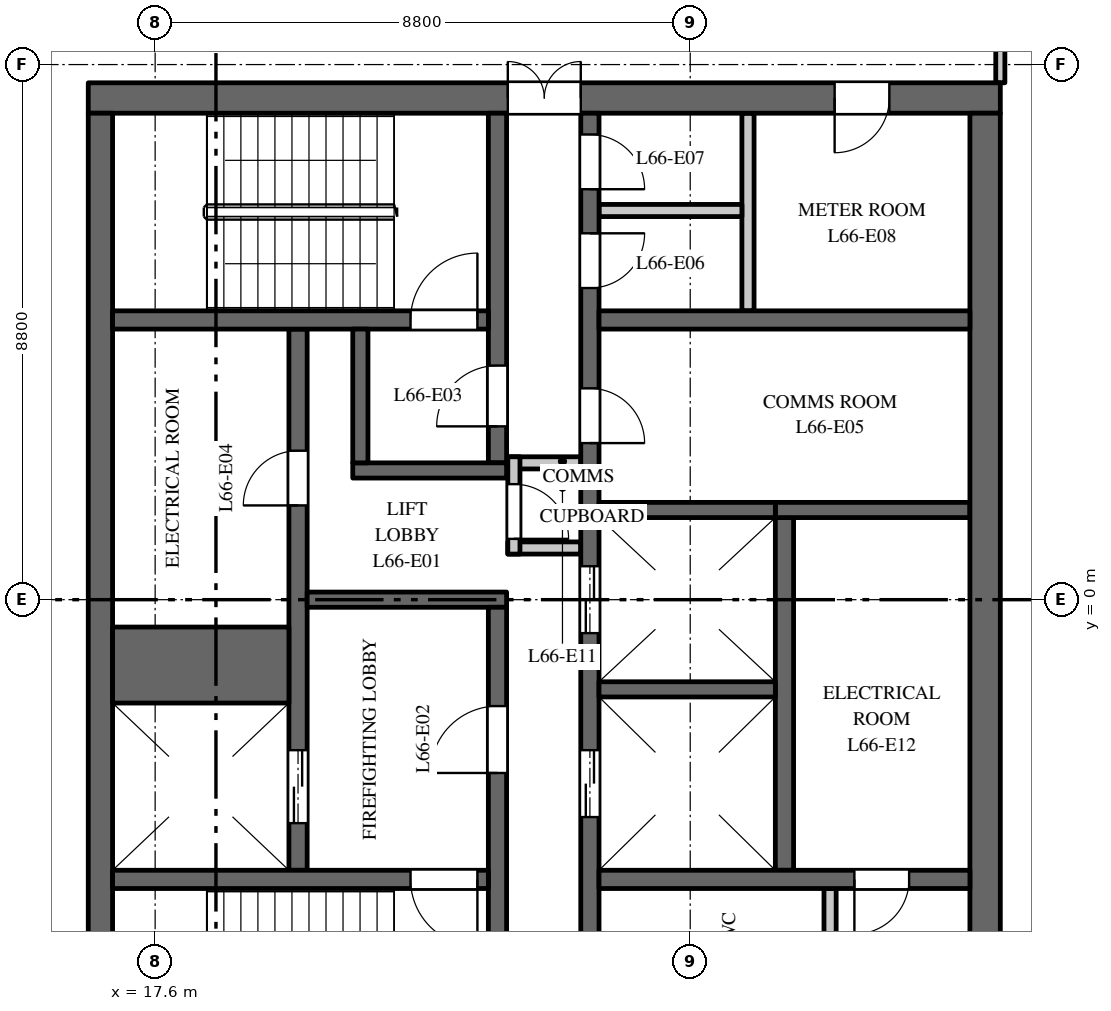
"""IFC4 building model, lengths in metres.
Left out: names, types, materials, properties, quantities, classifications, styles, units other than length and angle.
Written with IfcOpenShell. Run it as: python <this file> out.ifc"""

import sys

from ifc_helpers import new_model, si_unit, direction, frame, frame_2d, origin, place, context, subcontext, project, spatial, rectangle, extrude, element, fill, save


model = new_model("IFC4")
c1 = context("Model", 3, precision=1e-05, world=origin(), true_north=direction((0.0, 1.0)))
c2 = subcontext(c1, "Body", "Model", "MODEL_VIEW")
j1 = project(units=[si_unit("LENGTHUNIT", "METRE"), si_unit("PLANEANGLEUNIT", "RADIAN")], contexts=[c1])
p1 = place(None, origin())
s1 = spatial("IfcSite", under=j1, at=p1, CompositionType="ELEMENT")
p2 = place(p1, origin())
s2 = spatial("IfcBuilding", under=s1, at=p2, CompositionType="ELEMENT")
p3 = place(p2, frame((0.0, 0.0, 307.0)))
s3 = spatial("IfcBuildingStorey", under=s2, at=p3, CompositionType="ELEMENT", Elevation=307.0)
p4 = place(p3, frame((16.5, 8.25, 0.0), z_axis=(0.0, 0.0, 1.0), x_axis=(1.0, 0.0, 0.0)))
e1 = element("IfcWall", 1, at=p4, inside=s3, PredefinedType="SHEAR", context=c2, shape_type="SweptSolid", body=[
    extrude(rectangle(XDim=15.0, YDim=0.5, at=frame_2d((7.5, 0.0))), origin(), (0.0, 0.0, 1.0), 3.7),
])
p5 = place(p4, frame((6.9, 0.0, 0.0)))
e2 = element("IfcOpeningElement", 2, at=p5, cuts=e1, PredefinedType="OPENING", context=c2, shape_type="SweptSolid", body=[
    extrude(rectangle(XDim=1.2, YDim=2.1, at=frame_2d((0.6, 1.05))), frame((0.0, 0.26, 0.0), z_axis=(0.0, -1.0, 0.0), x_axis=(1.0, 0.0, 0.0)), (0.0, 0.0, 1.0), 0.52),
])
p6 = place(p4, frame((12.275, 0.0, 0.0)))
e3 = element("IfcOpeningElement", 3, at=p6, cuts=e1, PredefinedType="OPENING", context=c2, shape_type="SweptSolid", body=[
    extrude(rectangle(XDim=0.9, YDim=2.1, at=frame_2d((0.45, 1.05))), frame((0.0, 0.26, 0.0), z_axis=(0.0, -1.0, 0.0), x_axis=(1.0, 0.0, 0.0)), (0.0, 0.0, 1.0), 0.52),
])
p7 = place(p3, frame((27.95, -4.45, 0.0), z_axis=(0.0, 0.0, 1.0), x_axis=(0.0, 1.0, 0.0)))
e4 = element("IfcWall", 4, at=p7, inside=s3, PredefinedType="SHEAR", context=c2, shape_type="SweptSolid", body=[
    extrude(rectangle(XDim=5.8, YDim=0.3, at=frame_2d((2.9, 0.0))), origin(), (0.0, 0.0, 1.0), 3.7),
])
p8 = place(p3, frame((27.8, 1.475, 0.0), z_axis=(0.0, 0.0, 1.0), x_axis=(1.0, 0.0, 0.0)))
e5 = element("IfcWall", 5, at=p8, inside=s3, PredefinedType="SHEAR", context=c2, shape_type="SweptSolid", body=[
    extrude(rectangle(XDim=3.2, YDim=0.25, at=frame_2d((1.6, 0.0))), origin(), (0.0, 0.0, 1.0), 3.7),
])
p9 = place(p3, frame((19.95, -4.45, 0.0), z_axis=(0.0, 0.0, 1.0), x_axis=(0.0, 1.0, 0.0)))
e6 = element("IfcWall", 6, at=p9, inside=s3, PredefinedType="SHEAR", context=c2, shape_type="SweptSolid", body=[
    extrude(rectangle(XDim=8.9, YDim=0.3, at=frame_2d((4.45, 0.0))), origin(), (0.0, 0.0, 1.0), 3.7),
])
p10 = place(p9, frame((0.775, 0.0, 0.0)))
e7 = element("IfcOpeningElement", 7, at=p10, cuts=e6, PredefinedType="OPENING", context=c2, shape_type="SweptSolid", body=[
    extrude(rectangle(XDim=1.2, YDim=2.1, at=frame_2d((0.6, 1.05))), frame((0.0, 0.16, 0.0), z_axis=(0.0, -1.0, 0.0), x_axis=(1.0, 0.0, 0.0)), (0.0, 0.0, 1.0), 0.32),
])
p11 = place(p9, frame((6.0, 0.0, 0.0)))
e8 = element("IfcOpeningElement", 8, at=p11, cuts=e6, PredefinedType="OPENING", context=c2, shape_type="SweptSolid", body=[
    extrude(rectangle(XDim=0.9, YDim=2.1, at=frame_2d((0.45, 1.05))), frame((0.0, 0.16, 0.0), z_axis=(0.0, -1.0, 0.0), x_axis=(1.0, 0.0, 0.0)), (0.0, 0.0, 1.0), 0.32),
])
p12 = place(p3, frame((24.75, -8.0, 0.0), z_axis=(0.0, 0.0, 1.0), x_axis=(0.0, 1.0, 0.0)))
e9 = element("IfcWall", 9, at=p12, inside=s3, PredefinedType="SHEAR", context=c2, shape_type="SweptSolid", body=[
    extrude(rectangle(XDim=16.0, YDim=0.3, at=frame_2d((8.0, 0.0))), origin(), (0.0, 0.0, 1.0), 3.7),
])
p13 = place(p12, frame((4.425, 0.0, 0.0)))
e10 = element("IfcOpeningElement", 10, at=p13, cuts=e9, PredefinedType="OPENING", context=c2, shape_type="SweptSolid", body=[
    extrude(rectangle(XDim=1.1, YDim=2.1, at=frame_2d((0.55, 1.05))), frame((0.0, 0.16, 0.0), z_axis=(0.0, -1.0, 0.0), x_axis=(1.0, 0.0, 0.0)), (0.0, 0.0, 1.0), 0.32),
])
p14 = place(p12, frame((7.45, 0.0, 0.0)))
e11 = element("IfcOpeningElement", 11, at=p14, cuts=e9, PredefinedType="OPENING", context=c2, shape_type="SweptSolid", body=[
    extrude(rectangle(XDim=1.1, YDim=2.1, at=frame_2d((0.55, 1.05))), frame((0.0, 0.16, 0.0), z_axis=(0.0, -1.0, 0.0), x_axis=(1.0, 0.0, 0.0)), (0.0, 0.0, 1.0), 0.32),
])
p15 = place(p12, frame((10.575, 0.0, 0.0)))
e12 = element("IfcOpeningElement", 12, at=p15, cuts=e9, PredefinedType="OPENING", context=c2, shape_type="SweptSolid", body=[
    extrude(rectangle(XDim=0.9, YDim=2.1, at=frame_2d((0.45, 1.05))), frame((0.0, 0.16, 0.0), z_axis=(0.0, -1.0, 0.0), x_axis=(1.0, 0.0, 0.0)), (0.0, 0.0, 1.0), 0.32),
])
p16 = place(p12, frame((13.125, 0.0, 0.0)))
e13 = element("IfcOpeningElement", 13, at=p16, cuts=e9, PredefinedType="OPENING", context=c2, shape_type="SweptSolid", body=[
    extrude(rectangle(XDim=0.9, YDim=2.1, at=frame_2d((0.45, 1.05))), frame((0.0, 0.16, 0.0), z_axis=(0.0, -1.0, 0.0), x_axis=(1.0, 0.0, 0.0)), (0.0, 0.0, 1.0), 0.32),
])
p17 = place(p12, frame((14.75, 0.0, 0.0)))
e14 = element("IfcOpeningElement", 14, at=p17, cuts=e9, PredefinedType="OPENING", context=c2, shape_type="SweptSolid", body=[
    extrude(rectangle(XDim=0.9, YDim=2.1, at=frame_2d((0.45, 1.05))), frame((0.0, 0.16, 0.0), z_axis=(0.0, -1.0, 0.0), x_axis=(1.0, 0.0, 0.0)), (0.0, 0.0, 1.0), 0.32),
])
p18 = place(p12, frame((1.35, 0.0, 0.0)))
e15 = element("IfcOpeningElement", 15, at=p18, cuts=e9, PredefinedType="OPENING", context=c2, shape_type="SweptSolid", body=[
    extrude(rectangle(XDim=0.9, YDim=2.1, at=frame_2d((0.45, 1.05))), frame((0.0, 0.16, 0.0), z_axis=(0.0, -1.0, 0.0), x_axis=(1.0, 0.0, 0.0)), (0.0, 0.0, 1.0), 0.32),
])
p19 = place(p3, frame((20.1, 0.0, 0.0), z_axis=(0.0, 0.0, 1.0), x_axis=(1.0, 0.0, 0.0)))
e16 = element("IfcWall", 16, at=p19, inside=s3, PredefinedType="SHEAR", context=c2, shape_type="SweptSolid", body=[
    extrude(rectangle(XDim=3.28, YDim=0.25, at=frame_2d((1.64, 0.0))), origin(), (0.0, 0.0, 1.0), 3.7),
])
p20 = place(p3, frame((16.7, -8.0, 0.0), z_axis=(0.0, 0.0, 1.0), x_axis=(0.0, 1.0, 0.0)))
e17 = element("IfcWall", 17, at=p20, inside=s3, PredefinedType="SHEAR", context=c2, shape_type="SweptSolid", body=[
    extrude(rectangle(XDim=16.0, YDim=0.4, at=frame_2d((8.0, 0.0))), origin(), (0.0, 0.0, 1.0), 3.7),
])
for number, where, z_axis, x_axis in (
    (18, (23.4, 0.85, 0.0), (0.0, 0.0, 1.0), (1.0, 0.0, 0.0)),
    (19, (23.4, 2.25, 0.0), (0.0, 0.0, 1.0), (1.0, 0.0, 0.0)),
):
    element("IfcWall", number, at=place(p3, frame(where, z_axis=z_axis, x_axis=x_axis)), inside=s3, PredefinedType="PARTITIONING", context=c2, shape_type="SweptSolid", body=[
        extrude(rectangle(XDim=1.2, YDim=0.2, at=frame_2d((0.6, 0.0))), origin(), (0.0, 0.0, 1.0), 3.7),
    ])
p21 = place(p3, frame((23.5, 0.75, 0.0), z_axis=(0.0, 0.0, 1.0), x_axis=(0.0, 1.0, 0.0)))
e20 = element("IfcWall", 20, at=p21, inside=s3, PredefinedType="PARTITIONING", context=c2, shape_type="SweptSolid", body=[
    extrude(rectangle(XDim=1.6, YDim=0.2, at=frame_2d((0.8, 0.0))), origin(), (0.0, 0.0, 1.0), 3.7),
])
p22 = place(p21, frame((0.25, 0.0, 0.0)))
e21 = element("IfcOpeningElement", 21, at=p22, cuts=e20, PredefinedType="OPENING", context=c2, shape_type="SweptSolid", body=[
    extrude(rectangle(XDim=0.9, YDim=2.1, at=frame_2d((0.45, 1.05))), frame((0.0, 0.11, 0.0), z_axis=(0.0, -1.0, 0.0), x_axis=(1.0, 0.0, 0.0)), (0.0, 0.0, 1.0), 0.22),
])
p23 = place(p3, frame((31.25, -8.0, 0.0), z_axis=(0.0, 0.0, 1.0), x_axis=(0.0, 1.0, 0.0)))
e22 = element("IfcWall", 22, at=p23, inside=s3, PredefinedType="SHEAR", context=c2, shape_type="SweptSolid", body=[
    extrude(rectangle(XDim=16.0, YDim=0.5, at=frame_2d((8.0, 0.0))), origin(), (0.0, 0.0, 1.0), 3.7),
])
p24 = place(p3, frame((24.9, 4.6, 0.0), z_axis=(0.0, 0.0, 1.0), x_axis=(1.0, 0.0, 0.0)))
e23 = element("IfcWall", 23, at=p24, inside=s3, PredefinedType="SHEAR", context=c2, shape_type="SweptSolid", body=[
    extrude(rectangle(XDim=6.1, YDim=0.3, at=frame_2d((3.05, 0.0))), origin(), (0.0, 0.0, 1.0), 3.7),
])
for number, where, z_axis, x_axis in (
    (24, (27.35, 4.75, 0.0), (0.0, 0.0, 1.0), (0.0, 1.0, 0.0)),
    (25, (28.7, -8.0, 0.0), (0.0, 0.0, 1.0), (0.0, 1.0, 0.0)),
):
    element("IfcWall", number, at=place(p3, frame(where, z_axis=z_axis, x_axis=x_axis)), inside=s3, PredefinedType="PARTITIONING", context=c2, shape_type="SweptSolid", body=[
        extrude(rectangle(XDim=3.25, YDim=0.2, at=frame_2d((1.625, 0.0))), origin(), (0.0, 0.0, 1.0), 3.7),
    ])
p25 = place(p3, frame((24.9, 6.4, 0.0), z_axis=(0.0, 0.0, 1.0), x_axis=(1.0, 0.0, 0.0)))
e26 = element("IfcWall", 26, at=p25, inside=s3, PredefinedType="PARTITIONING", context=c2, shape_type="SweptSolid", body=[
    extrude(rectangle(XDim=2.35, YDim=0.2, at=frame_2d((1.175, 0.0))), origin(), (0.0, 0.0, 1.0), 3.7),
])
p26 = place(p3, frame((24.9, -4.6, 0.0), z_axis=(0.0, 0.0, 1.0), x_axis=(1.0, 0.0, 0.0)))
e27 = element("IfcWall", 27, at=p26, inside=s3, PredefinedType="SHEAR", context=c2, shape_type="SweptSolid", body=[
    extrude(rectangle(XDim=6.1, YDim=0.3, at=frame_2d((3.05, 0.0))), origin(), (0.0, 0.0, 1.0), 3.7),
])
p27 = place(p26, frame((4.2, 0.0, 0.0)))
e28 = element("IfcOpeningElement", 28, at=p27, cuts=e27, PredefinedType="OPENING", context=c2, shape_type="SweptSolid", body=[
    extrude(rectangle(XDim=0.9, YDim=2.1, at=frame_2d((0.45, 1.05))), frame((0.0, 0.16, 0.0), z_axis=(0.0, -1.0, 0.0), x_axis=(1.0, 0.0, 0.0)), (0.0, 0.0, 1.0), 0.32),
])
p28 = place(p3, frame((16.9, -1.075, 0.0), z_axis=(0.0, 0.0, 1.0), x_axis=(1.0, 0.0, 0.0)))
e29 = element("IfcWall", 29, at=p28, inside=s3, PredefinedType="SHEAR", context=c2, shape_type="SweptSolid", body=[
    extrude(rectangle(XDim=2.9, YDim=1.25, at=frame_2d((1.45, 0.0))), origin(), (0.0, 0.0, 1.0), 3.7),
])
for number, where, z_axis, x_axis in (
    (30, (24.9, -1.475, 0.0), (0.0, 0.0, 1.0), (1.0, 0.0, 0.0)),
    (31, (24.9, 1.475, 0.0), (0.0, 0.0, 1.0), (1.0, 0.0, 0.0)),
):
    element("IfcWall", number, at=place(p3, frame(where, z_axis=z_axis, x_axis=x_axis)), inside=s3, PredefinedType="SHEAR", context=c2, shape_type="SweptSolid", body=[
        extrude(rectangle(XDim=2.9, YDim=0.25, at=frame_2d((1.45, 0.0))), origin(), (0.0, 0.0, 1.0), 3.7),
    ])
p29 = place(p3, frame((23.23, 2.25, 0.0), z_axis=(0.0, 0.0, 1.0), x_axis=(0.0, 1.0, 0.0)))
e32 = element("IfcWall", 32, at=p29, inside=s3, PredefinedType="SHEAR", context=c2, shape_type="SweptSolid", body=[
    extrude(rectangle(XDim=5.75, YDim=0.3, at=frame_2d((2.875, 0.0))), origin(), (0.0, 0.0, 1.0), 3.7),
])
p30 = place(p29, frame((0.6, 0.0, 0.0)))
e33 = element("IfcOpeningElement", 33, at=p30, cuts=e32, PredefinedType="OPENING", context=c2, shape_type="SweptSolid", body=[
    extrude(rectangle(XDim=1.0, YDim=2.1, at=frame_2d((0.5, 1.05))), frame((0.0, 0.16, 0.0), z_axis=(0.0, -1.0, 0.0), x_axis=(1.0, 0.0, 0.0)), (0.0, 0.0, 1.0), 0.32),
])
p31 = place(p3, frame((23.23, -8.0, 0.0), z_axis=(0.0, 0.0, 1.0), x_axis=(0.0, 1.0, 0.0)))
e34 = element("IfcWall", 34, at=p31, inside=s3, PredefinedType="SHEAR", context=c2, shape_type="SweptSolid", body=[
    extrude(rectangle(XDim=7.875, YDim=0.3, at=frame_2d((3.938, 0.0))), origin(), (0.0, 0.0, 1.0), 3.7),
])
p32 = place(p31, frame((5.15, 0.0, 0.0)))
e35 = element("IfcOpeningElement", 35, at=p32, cuts=e34, PredefinedType="OPENING", context=c2, shape_type="SweptSolid", body=[
    extrude(rectangle(XDim=1.1, YDim=2.1, at=frame_2d((0.55, 1.05))), frame((0.0, 0.16, 0.0), z_axis=(0.0, -1.0, 0.0), x_axis=(1.0, 0.0, 0.0)), (0.0, 0.0, 1.0), 0.32),
])
p33 = place(p3, frame((16.9, 4.6, 0.0), z_axis=(0.0, 0.0, 1.0), x_axis=(1.0, 0.0, 0.0)))
e36 = element("IfcWall", 36, at=p33, inside=s3, PredefinedType="SHEAR", context=c2, shape_type="SweptSolid", body=[
    extrude(rectangle(XDim=6.18, YDim=0.3, at=frame_2d((3.09, 0.0))), origin(), (0.0, 0.0, 1.0), 3.7),
])
p34 = place(p33, frame((4.9, 0.0, 0.0)))
e37 = element("IfcOpeningElement", 37, at=p34, cuts=e36, PredefinedType="OPENING", context=c2, shape_type="SweptSolid", body=[
    extrude(rectangle(XDim=1.1, YDim=2.1, at=frame_2d((0.55, 1.05))), frame((0.0, 0.16, 0.0), z_axis=(0.0, -1.0, 0.0), x_axis=(1.0, 0.0, 0.0)), (0.0, 0.0, 1.0), 0.32),
])
p35 = place(p3, frame((16.9, -4.6, 0.0), z_axis=(0.0, 0.0, 1.0), x_axis=(1.0, 0.0, 0.0)))
e38 = element("IfcWall", 38, at=p35, inside=s3, PredefinedType="SHEAR", context=c2, shape_type="SweptSolid", body=[
    extrude(rectangle(XDim=6.18, YDim=0.3, at=frame_2d((3.09, 0.0))), origin(), (0.0, 0.0, 1.0), 3.7),
])
p36 = place(p35, frame((4.9, 0.0, 0.0)))
e39 = element("IfcOpeningElement", 39, at=p36, cuts=e38, PredefinedType="OPENING", context=c2, shape_type="SweptSolid", body=[
    extrude(rectangle(XDim=1.1, YDim=2.1, at=frame_2d((0.55, 1.05))), frame((0.0, 0.16, 0.0), z_axis=(0.0, -1.0, 0.0), x_axis=(1.0, 0.0, 0.0)), (0.0, 0.0, 1.0), 0.32),
])
p37 = place(p3, frame((20.85, 2.125, 0.0), z_axis=(0.0, 0.0, 1.0), x_axis=(1.0, 0.0, 0.0)))
e40 = element("IfcWall", 40, at=p37, inside=s3, PredefinedType="SHEAR", context=c2, shape_type="SweptSolid", body=[
    extrude(rectangle(XDim=2.53, YDim=0.25, at=frame_2d((1.265, 0.0))), origin(), (0.0, 0.0, 1.0), 3.7),
])
p38 = place(p3, frame((20.975, 2.25, 0.0), z_axis=(0.0, 0.0, 1.0), x_axis=(0.0, 1.0, 0.0)))
e41 = element("IfcWall", 41, at=p38, inside=s3, PredefinedType="SHEAR", context=c2, shape_type="SweptSolid", body=[
    extrude(rectangle(XDim=2.2, YDim=0.25, at=frame_2d((1.1, 0.0))), origin(), (0.0, 0.0, 1.0), 3.7),
])
p39 = place(p3, frame((31.5, 8.5, 0.0), z_axis=(0.0, 0.0, 1.0), x_axis=(0.0, 1.0, 0.0)))
e42 = element("IfcWall", 42, at=p39, inside=s3, PredefinedType="PARTITIONING", context=c2, shape_type="SweptSolid", body=[
    extrude(rectangle(XDim=3.0, YDim=0.15, at=frame_2d((1.5, 0.0))), origin(), (0.0, 0.0, 1.0), 3.0),
])
p40 = place(p10, origin())
e43 = element("IfcDoor", 43, at=p40, inside=s3, OperationType="DOUBLE_DOOR_SLIDING", PredefinedType="DOOR", context=c2, shape_type="SweptSolid", body=[
    extrude(rectangle(XDim=1.2, YDim=2.1, at=frame_2d((0.6, 1.05))), frame((0.0, 0.025, 0.0), z_axis=(0.0, -1.0, 0.0), x_axis=(1.0, 0.0, 0.0)), (0.0, 0.0, 1.0), 0.05),
])
fill(e7, e43)
p41 = place(p13, origin())
e44 = element("IfcDoor", 44, at=p41, inside=s3, OperationType="DOUBLE_DOOR_SLIDING", PredefinedType="DOOR", context=c2, shape_type="SweptSolid", body=[
    extrude(rectangle(XDim=1.1, YDim=2.1, at=frame_2d((0.55, 1.05))), frame((0.0, 0.025, 0.0), z_axis=(0.0, -1.0, 0.0), x_axis=(1.0, 0.0, 0.0)), (0.0, 0.0, 1.0), 0.05),
])
fill(e10, e44)
p42 = place(p14, origin())
e45 = element("IfcDoor", 45, at=p42, inside=s3, OperationType="DOUBLE_DOOR_SLIDING", PredefinedType="DOOR", context=c2, shape_type="SweptSolid", body=[
    extrude(rectangle(XDim=1.1, YDim=2.1, at=frame_2d((0.55, 1.05))), frame((0.0, 0.025, 0.0), z_axis=(0.0, -1.0, 0.0), x_axis=(1.0, 0.0, 0.0)), (0.0, 0.0, 1.0), 0.05),
])
fill(e11, e45)
p43 = place(p34, origin())
e46 = element("IfcDoor", 46, at=p43, inside=s3, OperationType="SINGLE_SWING_LEFT", PredefinedType="DOOR", context=c2, shape_type="SweptSolid", body=[
    extrude(rectangle(XDim=1.1, YDim=2.1, at=frame_2d((0.55, 1.05))), frame((0.0, 0.025, 0.0), z_axis=(0.0, -1.0, 0.0), x_axis=(1.0, 0.0, 0.0)), (0.0, 0.0, 1.0), 0.05),
])
fill(e37, e46)
p44 = place(p36, origin())
e47 = element("IfcDoor", 47, at=p44, inside=s3, OperationType="SINGLE_SWING_RIGHT", PredefinedType="DOOR", context=c2, shape_type="SweptSolid", body=[
    extrude(rectangle(XDim=1.1, YDim=2.1, at=frame_2d((0.55, 1.05))), frame((0.0, 0.025, 0.0), z_axis=(0.0, -1.0, 0.0), x_axis=(1.0, 0.0, 0.0)), (0.0, 0.0, 1.0), 0.05),
])
fill(e39, e47)
p45 = place(p32, origin())
e48 = element("IfcDoor", 48, at=p45, inside=s3, OperationType="SINGLE_SWING_RIGHT", PredefinedType="DOOR", context=c2, shape_type="SweptSolid", body=[
    extrude(rectangle(XDim=1.1, YDim=2.1, at=frame_2d((0.55, 1.05))), frame((0.0, 0.025, 0.0), z_axis=(0.0, -1.0, 0.0), x_axis=(1.0, 0.0, 0.0)), (0.0, 0.0, 1.0), 0.05),
])
fill(e35, e48)
p46 = place(p30, origin())
e49 = element("IfcDoor", 49, at=p46, inside=s3, OperationType="SINGLE_SWING_RIGHT", PredefinedType="DOOR", context=c2, shape_type="SweptSolid", body=[
    extrude(rectangle(XDim=1.0, YDim=2.1, at=frame_2d((0.5, 1.05))), frame((0.0, 0.025, 0.0), z_axis=(0.0, -1.0, 0.0), x_axis=(1.0, 0.0, 0.0)), (0.0, 0.0, 1.0), 0.05),
])
fill(e33, e49)
p47 = place(p5, origin())
e50 = element("IfcDoor", 50, at=p47, inside=s3, OperationType="DOUBLE_DOOR_DOUBLE_SWING", PredefinedType="DOOR", context=c2, shape_type="SweptSolid", body=[
    extrude(rectangle(XDim=1.2, YDim=2.1, at=frame_2d((0.6, 1.05))), frame((0.0, 0.025, 0.0), z_axis=(0.0, -1.0, 0.0), x_axis=(1.0, 0.0, 0.0)), (0.0, 0.0, 1.0), 0.05),
])
fill(e2, e50)
p48 = place(p11, origin())
e51 = element("IfcDoor", 51, at=p48, inside=s3, OperationType="SINGLE_SWING_RIGHT", PredefinedType="DOOR", context=c2, shape_type="SweptSolid", body=[
    extrude(rectangle(XDim=0.9, YDim=2.1, at=frame_2d((0.45, 1.05))), frame((0.0, 0.025, 0.0), z_axis=(0.0, -1.0, 0.0), x_axis=(1.0, 0.0, 0.0)), (0.0, 0.0, 1.0), 0.05),
])
fill(e8, e51)
p49 = place(p15, origin())
e52 = element("IfcDoor", 52, at=p49, inside=s3, OperationType="SINGLE_SWING_LEFT", PredefinedType="DOOR", context=c2, shape_type="SweptSolid", body=[
    extrude(rectangle(XDim=0.9, YDim=2.1, at=frame_2d((0.45, 1.05))), frame((0.0, 0.025, 0.0), z_axis=(0.0, -1.0, 0.0), x_axis=(1.0, 0.0, 0.0)), (0.0, 0.0, 1.0), 0.05),
])
fill(e12, e52)
p50 = place(p16, origin())
e53 = element("IfcDoor", 53, at=p50, inside=s3, OperationType="SINGLE_SWING_RIGHT", PredefinedType="DOOR", context=c2, shape_type="SweptSolid", body=[
    extrude(rectangle(XDim=0.9, YDim=2.1, at=frame_2d((0.45, 1.05))), frame((0.0, 0.025, 0.0), z_axis=(0.0, -1.0, 0.0), x_axis=(1.0, 0.0, 0.0)), (0.0, 0.0, 1.0), 0.05),
])
fill(e13, e53)
p51 = place(p17, origin())
e54 = element("IfcDoor", 54, at=p51, inside=s3, OperationType="SINGLE_SWING_LEFT", PredefinedType="DOOR", context=c2, shape_type="SweptSolid", body=[
    extrude(rectangle(XDim=0.9, YDim=2.1, at=frame_2d((0.45, 1.05))), frame((0.0, 0.025, 0.0), z_axis=(0.0, -1.0, 0.0), x_axis=(1.0, 0.0, 0.0)), (0.0, 0.0, 1.0), 0.05),
])
fill(e14, e54)
p52 = place(p6, origin())
e55 = element("IfcDoor", 55, at=p52, inside=s3, OperationType="SINGLE_SWING_LEFT", PredefinedType="DOOR", context=c2, shape_type="SweptSolid", body=[
    extrude(rectangle(XDim=0.9, YDim=2.1, at=frame_2d((0.45, 1.05))), frame((0.0, 0.025, 0.0), z_axis=(0.0, -1.0, 0.0), x_axis=(1.0, 0.0, 0.0)), (0.0, 0.0, 1.0), 0.05),
])
fill(e3, e55)
p53 = place(p22, origin())
e56 = element("IfcDoor", 56, at=p53, inside=s3, OperationType="SINGLE_SWING_LEFT", PredefinedType="DOOR", context=c2, shape_type="SweptSolid", body=[
    extrude(rectangle(XDim=0.9, YDim=2.1, at=frame_2d((0.45, 1.05))), frame((0.0, 0.025, 0.0), z_axis=(0.0, -1.0, 0.0), x_axis=(1.0, 0.0, 0.0)), (0.0, 0.0, 1.0), 0.05),
])
fill(e21, e56)
p54 = place(p27, origin())
e57 = element("IfcDoor", 57, at=p54, inside=s3, OperationType="SINGLE_SWING_LEFT", PredefinedType="DOOR", context=c2, shape_type="SweptSolid", body=[
    extrude(rectangle(XDim=0.9, YDim=2.1, at=frame_2d((0.45, 1.05))), frame((0.0, 0.025, 0.0), z_axis=(0.0, -1.0, 0.0), x_axis=(1.0, 0.0, 0.0)), (0.0, 0.0, 1.0), 0.05),
])
fill(e28, e57)
save(model, sys.argv[1])
